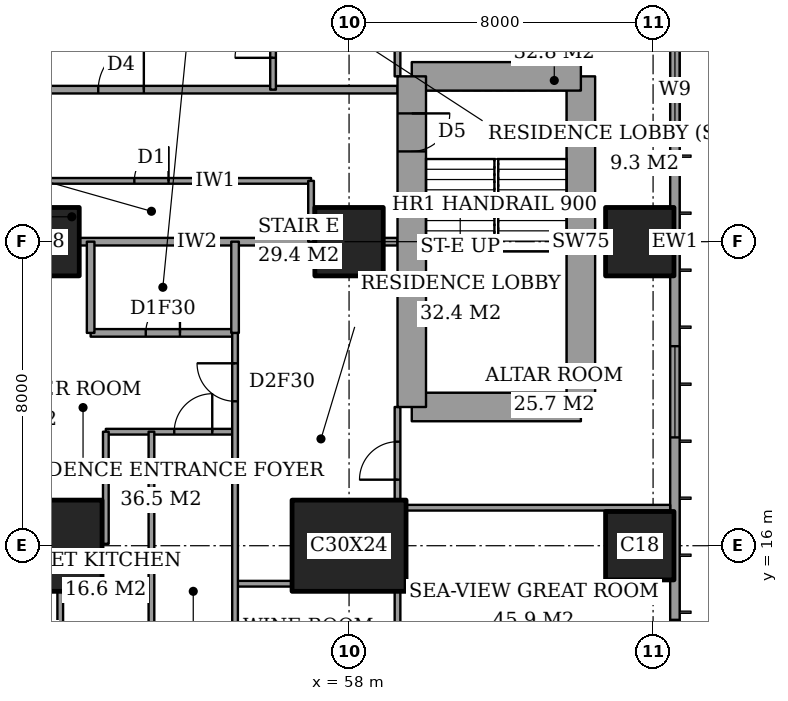
"""IFC4 building model, lengths in metres.
Left out: names, types, materials, properties, quantities, classifications, styles, units other than length and angle.
Written with IfcOpenShell. Run it as: python <this file> out.ifc"""

import sys

from ifc_helpers import new_model, si_unit, direction, frame, frame_2d, origin, origin_2d, place, context, subcontext, project, spatial, rectangle, extrude, element, fill, save


model = new_model("IFC4")
c1 = context("Model", 3, precision=1e-05, world=origin(), true_north=direction((0.0, 1.0)))
c2 = subcontext(c1, "Body", "Model", "MODEL_VIEW")
j1 = project(units=[si_unit("LENGTHUNIT", "METRE"), si_unit("PLANEANGLEUNIT", "RADIAN")], contexts=[c1])
p1 = place(None, origin())
s1 = spatial("IfcSite", under=j1, at=p1, CompositionType="ELEMENT")
p2 = place(p1, origin())
s2 = spatial("IfcBuilding", under=s1, at=p2, CompositionType="ELEMENT")
p3 = place(p2, frame((0.0, 0.0, 196.6)))
s3 = spatial("IfcBuildingStorey", under=s2, at=p3, CompositionType="ELEMENT", Elevation=196.6)
p4 = place(p3, frame((50.0, 16.0, 0.0), z_axis=(0.0, 0.0, 1.0), x_axis=(1.0, 0.0, 0.0)))
e1 = element("IfcColumn", 1, at=p4, inside=s3, PredefinedType="COLUMN", context=c2, shape_type="SweptSolid", body=[
    extrude(rectangle(XDim=3.0, YDim=2.4, at=origin_2d()), origin(), (0.0, 0.0, 1.0), 3.6),
])
p5 = place(p3, frame((50.0, 24.0, 0.0), z_axis=(0.0, 0.0, 1.0), x_axis=(1.0, 0.0, 0.0)))
e2 = element("IfcColumn", 2, at=p5, inside=s3, PredefinedType="COLUMN", context=c2, shape_type="SweptSolid", body=[
    extrude(rectangle(XDim=1.8, YDim=1.8, at=origin_2d()), origin(), (0.0, 0.0, 1.0), 3.6),
])
p6 = place(p3, frame((58.0, 16.0, 0.0), z_axis=(0.0, 0.0, 1.0), x_axis=(1.0, 0.0, 0.0)))
e3 = element("IfcColumn", 3, at=p6, inside=s3, PredefinedType="COLUMN", context=c2, shape_type="SweptSolid", body=[
    extrude(rectangle(XDim=3.0, YDim=2.4, at=origin_2d()), origin(), (0.0, 0.0, 1.0), 3.6),
])
for number, where, z_axis, x_axis in (
    (4, (58.0, 24.0, 0.0), (0.0, 0.0, 1.0), (1.0, 0.0, 0.0)),
    (5, (65.65, 16.0, 0.0), (0.0, 0.0, 1.0), (1.0, 0.0, 0.0)),
    (6, (65.65, 24.0, 0.0), (0.0, 0.0, 1.0), (1.0, 0.0, 0.0)),
):
    element("IfcColumn", number, at=place(p3, frame(where, z_axis=z_axis, x_axis=x_axis)), inside=s3, PredefinedType="COLUMN", context=c2, shape_type="SweptSolid", body=[
        extrude(rectangle(XDim=1.8, YDim=1.8, at=origin_2d()), origin(), (0.0, 0.0, 1.0), 3.6),
    ])
p7 = place(p3, frame((59.65, 19.65, 0.0), z_axis=(0.0, 0.0, 1.0), x_axis=(1.0, 0.0, 0.0)))
e7 = element("IfcWall", 7, at=p7, inside=s3, PredefinedType="SHEAR", context=c2, shape_type="SweptSolid", body=[
    extrude(rectangle(XDim=4.45, YDim=0.75, at=frame_2d((2.225, 0.0))), origin(), (0.0, 0.0, 1.0), 3.6),
])
p8 = place(p3, frame((64.1, 19.65, 0.0), z_axis=(0.0, 0.0, 1.0), x_axis=(0.0, 1.0, 0.0)))
e8 = element("IfcWall", 8, at=p8, inside=s3, PredefinedType="SHEAR", context=c2, shape_type="SweptSolid", body=[
    extrude(rectangle(XDim=8.7, YDim=0.75, at=frame_2d((4.35, 0.0))), origin(), (0.0, 0.0, 1.0), 3.6),
])
p9 = place(p3, frame((64.1, 28.35, 0.0), z_axis=(0.0, 0.0, 1.0), x_axis=(-1.0, 0.0, 0.0)))
e9 = element("IfcWall", 9, at=p9, inside=s3, PredefinedType="SHEAR", context=c2, shape_type="SweptSolid", body=[
    extrude(rectangle(XDim=4.45, YDim=0.75, at=frame_2d((2.225, 0.0))), origin(), (0.0, 0.0, 1.0), 3.6),
])
p10 = place(p3, frame((59.65, 28.35, 0.0), z_axis=(0.0, 0.0, 1.0), x_axis=(0.0, -1.0, 0.0)))
e10 = element("IfcWall", 10, at=p10, inside=s3, PredefinedType="SHEAR", context=c2, shape_type="SweptSolid", body=[
    extrude(rectangle(XDim=8.7, YDim=0.75, at=frame_2d((4.35, 0.0))), origin(), (0.0, 0.0, 1.0), 3.6),
])
p11 = place(p10, frame((0.975, 0.0, 0.0)))
e11 = element("IfcOpeningElement", 11, at=p11, cuts=e10, PredefinedType="OPENING", context=c2, shape_type="SweptSolid", body=[
    extrude(rectangle(XDim=1.0, YDim=2.1, at=frame_2d((0.5, 1.05))), frame((0.0, 0.385, 0.0), z_axis=(0.0, -1.0, 0.0), x_axis=(1.0, 0.0, 0.0)), (0.0, 0.0, 1.0), 0.77),
])
p12 = place(p3, frame((66.575, 3.175, 0.0), z_axis=(0.0, 0.0, 1.0), x_axis=(0.0, 1.0, 0.0)))
e12 = element("IfcWall", 12, at=p12, inside=s3, PredefinedType="SOLIDWALL", context=c2, shape_type="SweptSolid", body=[
    extrude(rectangle(XDim=41.65, YDim=0.25, at=frame_2d((20.825, 0.0))), origin(), (0.0, 0.0, 1.0), 3.6),
])
p13 = place(p12, frame((0.825, 0.0, 0.2)))
e13 = element("IfcOpeningElement", 13, at=p13, cuts=e12, PredefinedType="OPENING", context=c2, shape_type="SweptSolid", body=[
    extrude(rectangle(XDim=2.4, YDim=2.4, at=frame_2d((1.2, 1.2))), frame((0.0, 0.135, 0.0), z_axis=(0.0, -1.0, 0.0), x_axis=(1.0, 0.0, 0.0)), (0.0, 0.0, 1.0), 0.27),
])
p14 = place(p12, frame((6.05, 0.0, 0.2)))
e14 = element("IfcOpeningElement", 14, at=p14, cuts=e12, PredefinedType="OPENING", context=c2, shape_type="SweptSolid", body=[
    extrude(rectangle(XDim=1.2, YDim=2.4, at=frame_2d((0.6, 1.2))), frame((0.0, 0.135, 0.0), z_axis=(0.0, -1.0, 0.0), x_axis=(1.0, 0.0, 0.0)), (0.0, 0.0, 1.0), 0.27),
])
p15 = place(p12, frame((8.475, 0.0, 0.2)))
e15 = element("IfcOpeningElement", 15, at=p15, cuts=e12, PredefinedType="OPENING", context=c2, shape_type="SweptSolid", body=[
    extrude(rectangle(XDim=2.4, YDim=2.4, at=frame_2d((1.2, 1.2))), frame((0.0, 0.135, 0.0), z_axis=(0.0, -1.0, 0.0), x_axis=(1.0, 0.0, 0.0)), (0.0, 0.0, 1.0), 0.27),
])
p16 = place(p12, frame((15.675, 0.0, 0.2)))
e16 = element("IfcOpeningElement", 16, at=p16, cuts=e12, PredefinedType="OPENING", context=c2, shape_type="SweptSolid", body=[
    extrude(rectangle(XDim=2.4, YDim=2.4, at=frame_2d((1.2, 1.2))), frame((0.0, 0.135, 0.0), z_axis=(0.0, -1.0, 0.0), x_axis=(1.0, 0.0, 0.0)), (0.0, 0.0, 1.0), 0.27),
])
p17 = place(p12, frame((23.625, 0.0, 0.2)))
e17 = element("IfcOpeningElement", 17, at=p17, cuts=e12, PredefinedType="OPENING", context=c2, shape_type="SweptSolid", body=[
    extrude(rectangle(XDim=2.4, YDim=2.4, at=frame_2d((1.2, 1.2))), frame((0.0, 0.135, 0.0), z_axis=(0.0, -1.0, 0.0), x_axis=(1.0, 0.0, 0.0)), (0.0, 0.0, 1.0), 0.27),
])
p18 = place(p12, frame((30.775, 0.0, 0.2)))
e18 = element("IfcOpeningElement", 18, at=p18, cuts=e12, PredefinedType="OPENING", context=c2, shape_type="SweptSolid", body=[
    extrude(rectangle(XDim=2.4, YDim=2.4, at=frame_2d((1.2, 1.2))), frame((0.0, 0.135, 0.0), z_axis=(0.0, -1.0, 0.0), x_axis=(1.0, 0.0, 0.0)), (0.0, 0.0, 1.0), 0.27),
])
p19 = place(p12, frame((34.55, 0.0, 0.2)))
e19 = element("IfcOpeningElement", 19, at=p19, cuts=e12, PredefinedType="OPENING", context=c2, shape_type="SweptSolid", body=[
    extrude(rectangle(XDim=1.2, YDim=2.4, at=frame_2d((0.6, 1.2))), frame((0.0, 0.135, 0.0), z_axis=(0.0, -1.0, 0.0), x_axis=(1.0, 0.0, 0.0)), (0.0, 0.0, 1.0), 0.27),
])
p20 = place(p12, frame((38.425, 0.0, 0.2)))
e20 = element("IfcOpeningElement", 20, at=p20, cuts=e12, PredefinedType="OPENING", context=c2, shape_type="SweptSolid", body=[
    extrude(rectangle(XDim=2.4, YDim=2.4, at=frame_2d((1.2, 1.2))), frame((0.0, 0.135, 0.0), z_axis=(0.0, -1.0, 0.0), x_axis=(1.0, 0.0, 0.0)), (0.0, 0.0, 1.0), 0.27),
])
p21 = place(p3, frame((55.0, 15.0, 0.0), z_axis=(0.0, 0.0, 1.0), x_axis=(1.0, 0.0, 0.0)))
e21 = element("IfcWall", 21, at=p21, inside=s3, PredefinedType="PARTITIONING", context=c2, shape_type="SweptSolid", body=[
    extrude(rectangle(XDim=1.5, YDim=0.15, at=frame_2d((0.75, 0.0))), origin(), (0.0, 0.0, 1.0), 3.35),
])
p22 = place(p3, frame((59.5, 17.0, 0.0), z_axis=(0.0, 0.0, 1.0), x_axis=(1.0, 0.0, 0.0)))
e22 = element("IfcWall", 22, at=p22, inside=s3, PredefinedType="PARTITIONING", context=c2, shape_type="SweptSolid", body=[
    extrude(rectangle(XDim=6.95, YDim=0.15, at=frame_2d((3.475, 0.0))), origin(), (0.0, 0.0, 1.0), 3.35),
])
p23 = place(p3, frame((51.6, 19.0, 0.0), z_axis=(0.0, 0.0, 1.0), x_axis=(1.0, 0.0, 0.0)))
e23 = element("IfcWall", 23, at=p23, inside=s3, PredefinedType="PARTITIONING", context=c2, shape_type="SweptSolid", body=[
    extrude(rectangle(XDim=3.4, YDim=0.15, at=frame_2d((1.7, 0.0))), origin(), (0.0, 0.0, 1.0), 3.35),
])
p24 = place(p23, frame((1.8, 0.0, 0.0)))
e24 = element("IfcOpeningElement", 24, at=p24, cuts=e23, PredefinedType="OPENING", context=c2, shape_type="SweptSolid", body=[
    extrude(rectangle(XDim=1.0, YDim=2.1, at=frame_2d((0.5, 1.05))), frame((0.0, 0.085, 0.0), z_axis=(0.0, -1.0, 0.0), x_axis=(1.0, 0.0, 0.0)), (0.0, 0.0, 1.0), 0.17),
])
p25 = place(p3, frame((51.2, 21.6, 0.0), z_axis=(0.0, 0.0, 1.0), x_axis=(1.0, 0.0, 0.0)))
e25 = element("IfcWall", 25, at=p25, inside=s3, PredefinedType="PARTITIONING", context=c2, shape_type="SweptSolid", body=[
    extrude(rectangle(XDim=3.8, YDim=0.2, at=frame_2d((1.9, 0.0))), origin(), (0.0, 0.0, 1.0), 3.35),
])
p26 = place(p25, frame((1.45, 0.0, 0.0)))
e26 = element("IfcOpeningElement", 26, at=p26, cuts=e25, PredefinedType="OPENING", context=c2, shape_type="SweptSolid", body=[
    extrude(rectangle(XDim=0.9, YDim=2.1, at=frame_2d((0.45, 1.05))), frame((0.0, 0.11, 0.0), z_axis=(0.0, -1.0, 0.0), x_axis=(1.0, 0.0, 0.0)), (0.0, 0.0, 1.0), 0.22),
])
p27 = place(p3, frame((50.9, 24.0, 0.0), z_axis=(0.0, 0.0, 1.0), x_axis=(1.0, 0.0, 0.0)))
e27 = element("IfcWall", 27, at=p27, inside=s3, PredefinedType="PARTITIONING", context=c2, shape_type="SweptSolid", body=[
    extrude(rectangle(XDim=6.2, YDim=0.2, at=frame_2d((3.1, 0.0))), origin(), (0.0, 0.0, 1.0), 3.35),
])
p28 = place(p3, frame((58.9, 24.0, 0.0), z_axis=(0.0, 0.0, 1.0), x_axis=(1.0, 0.0, 0.0)))
e28 = element("IfcWall", 28, at=p28, inside=s3, PredefinedType="PARTITIONING", context=c2, shape_type="SweptSolid", body=[
    extrude(rectangle(XDim=0.375, YDim=0.2, at=frame_2d((0.188, 0.0))), origin(), (0.0, 0.0, 1.0), 3.35),
])
p29 = place(p3, frame((48.6, 25.6, 0.0), z_axis=(0.0, 0.0, 1.0), x_axis=(1.0, 0.0, 0.0)))
e29 = element("IfcWall", 29, at=p29, inside=s3, PredefinedType="PARTITIONING", context=c2, shape_type="SweptSolid", body=[
    extrude(rectangle(XDim=8.4, YDim=0.15, at=frame_2d((4.2, 0.0))), origin(), (0.0, 0.0, 1.0), 3.35),
])
p30 = place(p29, frame((3.75, 0.0, 0.0)))
e30 = element("IfcOpeningElement", 30, at=p30, cuts=e29, PredefinedType="OPENING", context=c2, shape_type="SweptSolid", body=[
    extrude(rectangle(XDim=0.9, YDim=2.1, at=frame_2d((0.45, 1.05))), frame((0.0, 0.085, 0.0), z_axis=(0.0, -1.0, 0.0), x_axis=(1.0, 0.0, 0.0)), (0.0, 0.0, 1.0), 0.17),
])
p31 = place(p3, frame((42.0, 28.0, 0.0), z_axis=(0.0, 0.0, 1.0), x_axis=(1.0, 0.0, 0.0)))
e31 = element("IfcWall", 31, at=p31, inside=s3, PredefinedType="PARTITIONING", context=c2, shape_type="SweptSolid", body=[
    extrude(rectangle(XDim=17.275, YDim=0.2, at=frame_2d((8.637, 0.0))), origin(), (0.0, 0.0, 1.0), 3.35),
])
p32 = place(p31, frame((9.4, 0.0, 0.0)))
e32 = element("IfcOpeningElement", 32, at=p32, cuts=e31, PredefinedType="OPENING", context=c2, shape_type="SweptSolid", body=[
    extrude(rectangle(XDim=1.2, YDim=2.4, at=frame_2d((0.6, 1.2))), frame((0.0, 0.11, 0.0), z_axis=(0.0, -1.0, 0.0), x_axis=(1.0, 0.0, 0.0)), (0.0, 0.0, 1.0), 0.22),
])
p33 = place(p3, frame((50.4, 10.6, 0.0), z_axis=(0.0, 0.0, 1.0), x_axis=(0.0, 1.0, 0.0)))
e33 = element("IfcWall", 33, at=p33, inside=s3, PredefinedType="PARTITIONING", context=c2, shape_type="SweptSolid", body=[
    extrude(rectangle(XDim=4.2, YDim=0.15, at=frame_2d((2.1, 0.0))), origin(), (0.0, 0.0, 1.0), 3.35),
])
p34 = place(p3, frame((51.2, 21.6, 0.0), z_axis=(0.0, 0.0, 1.0), x_axis=(0.0, 1.0, 0.0)))
e34 = element("IfcWall", 34, at=p34, inside=s3, PredefinedType="PARTITIONING", context=c2, shape_type="SweptSolid", body=[
    extrude(rectangle(XDim=2.4, YDim=0.2, at=frame_2d((1.2, 0.0))), origin(), (0.0, 0.0, 1.0), 3.35),
])
p35 = place(p3, frame((51.6, 16.05, 0.0), z_axis=(0.0, 0.0, 1.0), x_axis=(0.0, 1.0, 0.0)))
e35 = element("IfcWall", 35, at=p35, inside=s3, PredefinedType="PARTITIONING", context=c2, shape_type="SweptSolid", body=[
    extrude(rectangle(XDim=2.95, YDim=0.15, at=frame_2d((1.475, 0.0))), origin(), (0.0, 0.0, 1.0), 3.35),
])
p36 = place(p3, frame((52.8, 10.6, 0.0), z_axis=(0.0, 0.0, 1.0), x_axis=(0.0, 1.0, 0.0)))
e36 = element("IfcWall", 36, at=p36, inside=s3, PredefinedType="PARTITIONING", context=c2, shape_type="SweptSolid", body=[
    extrude(rectangle(XDim=8.4, YDim=0.15, at=frame_2d((4.2, 0.0))), origin(), (0.0, 0.0, 1.0), 3.35),
])
p37 = place(p3, frame((55.0, 21.6, 0.0), z_axis=(0.0, 0.0, 1.0), x_axis=(0.0, 1.0, 0.0)))
e37 = element("IfcWall", 37, at=p37, inside=s3, PredefinedType="PARTITIONING", context=c2, shape_type="SweptSolid", body=[
    extrude(rectangle(XDim=2.4, YDim=0.2, at=frame_2d((1.2, 0.0))), origin(), (0.0, 0.0, 1.0), 3.35),
])
p38 = place(p3, frame((55.0, 10.6, 0.0), z_axis=(0.0, 0.0, 1.0), x_axis=(0.0, 1.0, 0.0)))
e38 = element("IfcWall", 38, at=p38, inside=s3, PredefinedType="PARTITIONING", context=c2, shape_type="SweptSolid", body=[
    extrude(rectangle(XDim=11.0, YDim=0.15, at=frame_2d((5.5, 0.0))), origin(), (0.0, 0.0, 1.0), 3.35),
])
p39 = place(p38, frame((9.2, 0.0, 0.0)))
e39 = element("IfcOpeningElement", 39, at=p39, cuts=e38, PredefinedType="OPENING", context=c2, shape_type="SweptSolid", body=[
    extrude(rectangle(XDim=1.0, YDim=2.1, at=frame_2d((0.5, 1.05))), frame((0.0, 0.085, 0.0), z_axis=(0.0, -1.0, 0.0), x_axis=(1.0, 0.0, 0.0)), (0.0, 0.0, 1.0), 0.17),
])
p40 = place(p3, frame((56.0, 28.0, 0.0), z_axis=(0.0, 0.0, 1.0), x_axis=(0.0, 1.0, 0.0)))
e40 = element("IfcWall", 40, at=p40, inside=s3, PredefinedType="PARTITIONING", context=c2, shape_type="SweptSolid", body=[
    extrude(rectangle(XDim=9.4, YDim=0.15, at=frame_2d((4.7, 0.0))), origin(), (0.0, 0.0, 1.0), 3.35),
])
p41 = place(p40, frame((0.837, 0.0, 0.0)))
e41 = element("IfcOpeningElement", 41, at=p41, cuts=e40, PredefinedType="OPENING", context=c2, shape_type="SweptSolid", body=[
    extrude(rectangle(XDim=1.0, YDim=2.1, at=frame_2d((0.5, 1.05))), frame((0.0, 0.085, 0.0), z_axis=(0.0, -1.0, 0.0), x_axis=(1.0, 0.0, 0.0)), (0.0, 0.0, 1.0), 0.17),
])
p42 = place(p3, frame((57.0, 24.0, 0.0), z_axis=(0.0, 0.0, 1.0), x_axis=(0.0, 1.0, 0.0)))
e42 = element("IfcWall", 42, at=p42, inside=s3, PredefinedType="PARTITIONING", context=c2, shape_type="SweptSolid", body=[
    extrude(rectangle(XDim=1.6, YDim=0.15, at=frame_2d((0.8, 0.0))), origin(), (0.0, 0.0, 1.0), 3.35),
])
p43 = place(p3, frame((59.275, 10.6, 0.0), z_axis=(0.0, 0.0, 1.0), x_axis=(0.0, 1.0, 0.0)))
e43 = element("IfcWall", 43, at=p43, inside=s3, PredefinedType="PARTITIONING", context=c2, shape_type="SweptSolid", body=[
    extrude(rectangle(XDim=4.2, YDim=0.15, at=frame_2d((2.1, 0.0))), origin(), (0.0, 0.0, 1.0), 3.35),
])
p44 = place(p3, frame((59.275, 17.2, 0.0), z_axis=(0.0, 0.0, 1.0), x_axis=(0.0, 1.0, 0.0)))
e44 = element("IfcWall", 44, at=p44, inside=s3, PredefinedType="PARTITIONING", context=c2, shape_type="SweptSolid", body=[
    extrude(rectangle(XDim=2.45, YDim=0.15, at=frame_2d((1.225, 0.0))), origin(), (0.0, 0.0, 1.0), 3.35),
])
p45 = place(p44, frame((0.538, 0.0, 0.0)))
e45 = element("IfcOpeningElement", 45, at=p45, cuts=e44, PredefinedType="OPENING", context=c2, shape_type="SweptSolid", body=[
    extrude(rectangle(XDim=1.0, YDim=2.1, at=frame_2d((0.5, 1.05))), frame((0.0, 0.085, 0.0), z_axis=(0.0, -1.0, 0.0), x_axis=(1.0, 0.0, 0.0)), (0.0, 0.0, 1.0), 0.17),
])
p46 = place(p3, frame((59.275, 28.35, 0.0), z_axis=(0.0, 0.0, 1.0), x_axis=(0.0, 1.0, 0.0)))
e46 = element("IfcWall", 46, at=p46, inside=s3, PredefinedType="PARTITIONING", context=c2, shape_type="SweptSolid", body=[
    extrude(rectangle(XDim=2.45, YDim=0.15, at=frame_2d((1.225, 0.0))), origin(), (0.0, 0.0, 1.0), 3.35),
])
p47 = place(p46, frame((0.962, 0.0, 0.0)))
e47 = element("IfcOpeningElement", 47, at=p47, cuts=e46, PredefinedType="OPENING", context=c2, shape_type="SweptSolid", body=[
    extrude(rectangle(XDim=0.9, YDim=2.1, at=frame_2d((0.45, 1.05))), frame((0.0, 0.085, 0.0), z_axis=(0.0, -1.0, 0.0), x_axis=(1.0, 0.0, 0.0)), (0.0, 0.0, 1.0), 0.17),
])
p48 = place(p15, origin())
e48 = element("IfcWindow", 48, at=p48, inside=s3, PartitioningType="SINGLE_PANEL", PredefinedType="WINDOW", context=c2, shape_type="SweptSolid", body=[
    extrude(rectangle(XDim=2.4, YDim=2.4, at=frame_2d((1.2, 1.2))), frame((0.0, 0.03, 0.0), z_axis=(0.0, -1.0, 0.0), x_axis=(1.0, 0.0, 0.0)), (0.0, 0.0, 1.0), 0.06),
])
fill(e15, e48)
p49 = place(p16, origin())
e49 = element("IfcWindow", 49, at=p49, inside=s3, PartitioningType="SINGLE_PANEL", PredefinedType="WINDOW", context=c2, shape_type="SweptSolid", body=[
    extrude(rectangle(XDim=2.4, YDim=2.4, at=frame_2d((1.2, 1.2))), frame((0.0, 0.03, 0.0), z_axis=(0.0, -1.0, 0.0), x_axis=(1.0, 0.0, 0.0)), (0.0, 0.0, 1.0), 0.06),
])
fill(e16, e49)
p50 = place(p17, origin())
e50 = element("IfcWindow", 50, at=p50, inside=s3, PartitioningType="SINGLE_PANEL", PredefinedType="WINDOW", context=c2, shape_type="SweptSolid", body=[
    extrude(rectangle(XDim=2.4, YDim=2.4, at=frame_2d((1.2, 1.2))), frame((0.0, 0.03, 0.0), z_axis=(0.0, -1.0, 0.0), x_axis=(1.0, 0.0, 0.0)), (0.0, 0.0, 1.0), 0.06),
])
fill(e17, e50)
p51 = place(p45, origin())
e51 = element("IfcDoor", 51, at=p51, inside=s3, OperationType="SINGLE_SWING_RIGHT", PredefinedType="DOOR", context=c2, shape_type="SweptSolid", body=[
    extrude(rectangle(XDim=1.0, YDim=2.1, at=frame_2d((0.5, 1.05))), frame((0.0, 0.025, 0.0), z_axis=(0.0, -1.0, 0.0), x_axis=(1.0, 0.0, 0.0)), (0.0, 0.0, 1.0), 0.05),
])
fill(e45, e51)
p52 = place(p39, origin())
e52 = element("IfcDoor", 52, at=p52, inside=s3, OperationType="SINGLE_SWING_LEFT", PredefinedType="DOOR", context=c2, shape_type="SweptSolid", body=[
    extrude(rectangle(XDim=1.0, YDim=2.1, at=frame_2d((0.5, 1.05))), frame((0.0, 0.025, 0.0), z_axis=(0.0, -1.0, 0.0), x_axis=(1.0, 0.0, 0.0)), (0.0, 0.0, 1.0), 0.05),
])
fill(e39, e52)
p53 = place(p26, origin())
e53 = element("IfcDoor", 53, at=p53, inside=s3, OperationType="SINGLE_SWING_LEFT", PredefinedType="DOOR", context=c2, shape_type="SweptSolid", body=[
    extrude(rectangle(XDim=0.9, YDim=2.1, at=frame_2d((0.45, 1.05))), frame((0.0, 0.025, 0.0), z_axis=(0.0, -1.0, 0.0), x_axis=(1.0, 0.0, 0.0)), (0.0, 0.0, 1.0), 0.05),
])
fill(e26, e53)
p54 = place(p24, origin())
e54 = element("IfcDoor", 54, at=p54, inside=s3, OperationType="SINGLE_SWING_LEFT", PredefinedType="DOOR", context=c2, shape_type="SweptSolid", body=[
    extrude(rectangle(XDim=1.0, YDim=2.1, at=frame_2d((0.5, 1.05))), frame((0.0, 0.025, 0.0), z_axis=(0.0, -1.0, 0.0), x_axis=(1.0, 0.0, 0.0)), (0.0, 0.0, 1.0), 0.05),
])
fill(e24, e54)
p55 = place(p41, origin())
e55 = element("IfcDoor", 55, at=p55, inside=s3, OperationType="SINGLE_SWING_RIGHT", PredefinedType="DOOR", context=c2, shape_type="SweptSolid", body=[
    extrude(rectangle(XDim=1.0, YDim=2.1, at=frame_2d((0.5, 1.05))), frame((0.0, 0.025, 0.0), z_axis=(0.0, -1.0, 0.0), x_axis=(1.0, 0.0, 0.0)), (0.0, 0.0, 1.0), 0.05),
])
fill(e41, e55)
p56 = place(p32, origin())
e56 = element("IfcDoor", 56, at=p56, inside=s3, OperationType="SINGLE_SWING_LEFT", PredefinedType="DOOR", context=c2, shape_type="SweptSolid", body=[
    extrude(rectangle(XDim=1.2, YDim=2.4, at=frame_2d((0.6, 1.2))), frame((0.0, 0.025, 0.0), z_axis=(0.0, -1.0, 0.0), x_axis=(1.0, 0.0, 0.0)), (0.0, 0.0, 1.0), 0.05),
])
fill(e32, e56)
p57 = place(p30, origin())
e57 = element("IfcDoor", 57, at=p57, inside=s3, OperationType="SINGLE_SWING_LEFT", PredefinedType="DOOR", context=c2, shape_type="SweptSolid", body=[
    extrude(rectangle(XDim=0.9, YDim=2.1, at=frame_2d((0.45, 1.05))), frame((0.0, 0.025, 0.0), z_axis=(0.0, -1.0, 0.0), x_axis=(1.0, 0.0, 0.0)), (0.0, 0.0, 1.0), 0.05),
])
fill(e30, e57)
p58 = place(p11, origin())
e58 = element("IfcDoor", 58, at=p58, inside=s3, OperationType="SINGLE_SWING_RIGHT", PredefinedType="DOOR", context=c2, shape_type="SweptSolid", body=[
    extrude(rectangle(XDim=1.0, YDim=2.1, at=frame_2d((0.5, 1.05))), frame((0.0, 0.025, 0.0), z_axis=(0.0, -1.0, 0.0), x_axis=(1.0, 0.0, 0.0)), (0.0, 0.0, 1.0), 0.05),
])
fill(e11, e58)
save(model, sys.argv[1])
